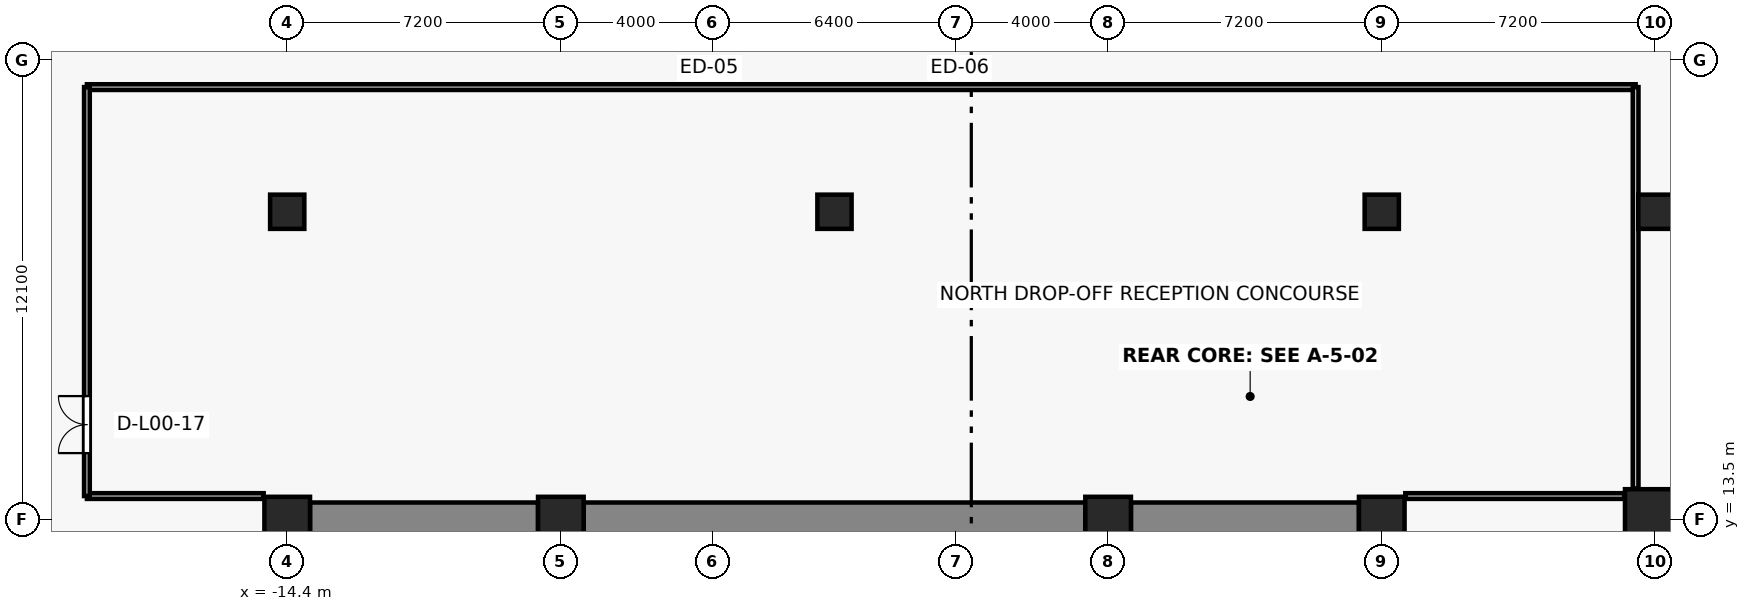
"""IFC4 building model, lengths in metres.
Left out: names, types, materials, properties, quantities, classifications, styles, units other than length and angle.
Written with IfcOpenShell. Run it as: python <this file> out.ifc"""

import sys

from ifc_helpers import new_model, si_unit, direction, frame, frame_2d, origin, origin_2d, place, context, subcontext, project, spatial, rectangle, extrude, source, transform, mapped, element, fill, save


model = new_model("IFC4")
c1 = context("Model", 3, precision=1e-05, world=origin(), true_north=direction((0.0, 1.0)))
c2 = subcontext(c1, "Body", "Model", "MODEL_VIEW")
j1 = project(units=[si_unit("LENGTHUNIT", "METRE"), si_unit("PLANEANGLEUNIT", "RADIAN")], contexts=[c1])
p1 = place(None, origin())
s1 = spatial("IfcSite", under=j1, at=p1, CompositionType="ELEMENT")
p2 = place(p1, origin())
s2 = spatial("IfcBuilding", under=s1, at=p2, CompositionType="ELEMENT")
p3 = place(p2, origin())
s3 = spatial("IfcBuildingStorey", under=s2, at=p3, CompositionType="ELEMENT", Elevation=0.0)
for number, where, z_axis, x_axis in (
    (1, (-14.4, 13.5, 0.0), (0.0, 0.0, 1.0), (1.0, 0.0, 0.0)),
    (2, (-7.2, 13.5, 0.0), (0.0, 0.0, 1.0), (1.0, 0.0, 0.0)),
    (3, (7.2, 13.5, 0.0), (0.0, 0.0, 1.0), (1.0, 0.0, 0.0)),
    (4, (14.4, 13.5, 0.0), (0.0, 0.0, 1.0), (1.0, 0.0, 0.0)),
):
    element("IfcColumn", number, at=place(p3, frame(where, z_axis=z_axis, x_axis=x_axis)), inside=s3, PredefinedType="COLUMN", context=c2, shape_type="SweptSolid", body=[
        extrude(rectangle(XDim=1.2, YDim=1.2, at=origin_2d()), origin(), (0.0, 0.0, 1.0), 5.0),
    ])
p4 = place(p3, frame((21.6, 13.5, 0.0), z_axis=(0.0, 0.0, 1.0), x_axis=(1.0, 0.0, 0.0)))
e5 = element("IfcColumn", 5, at=p4, inside=s3, PredefinedType="COLUMN", context=c2, shape_type="SweptSolid", body=[
    extrude(rectangle(XDim=1.6, YDim=1.6, at=origin_2d()), origin(), (0.0, 0.0, 1.0), 5.0),
])
for number, where, z_axis, x_axis in (
    (6, (21.6, 21.6, 0.0), (0.0, 0.0, 1.0), (1.0, 0.0, 0.0)),
    (7, (-14.4, 21.6, 0.0), (0.0, 0.0, 1.0), (1.0, 0.0, 0.0)),
    (8, (0.0, 21.6, 0.0), (0.0, 0.0, 1.0), (1.0, 0.0, 0.0)),
    (9, (14.4, 21.6, 0.0), (0.0, 0.0, 1.0), (1.0, 0.0, 0.0)),
):
    element("IfcColumn", number, at=place(p3, frame(where, z_axis=z_axis, x_axis=x_axis)), inside=s3, PredefinedType="COLUMN", context=c2, shape_type="SweptSolid", body=[
        extrude(rectangle(XDim=0.9, YDim=0.9, at=origin_2d()), origin(), (0.0, 0.0, 1.0), 5.0),
    ])
p5 = place(p3, frame((-13.8, 13.5, 0.0), z_axis=(0.0, 0.0, 1.0), x_axis=(1.0, 0.0, 0.0)))
e10 = element("IfcWall", 10, at=p5, inside=s3, PredefinedType="SHEAR", context=c2, shape_type="SweptSolid", body=[
    extrude(rectangle(XDim=6.0, YDim=0.9, at=frame_2d((3.0, 0.0))), origin(), (0.0, 0.0, 1.0), 4.7),
])
p6 = place(p3, frame((-6.6, 13.5, 0.0), z_axis=(0.0, 0.0, 1.0), x_axis=(1.0, 0.0, 0.0)))
e11 = element("IfcWall", 11, at=p6, inside=s3, PredefinedType="SHEAR", context=c2, shape_type="SweptSolid", body=[
    extrude(rectangle(XDim=13.2, YDim=0.9, at=frame_2d((6.6, 0.0))), origin(), (0.0, 0.0, 1.0), 4.7),
])
p7 = place(p3, frame((7.8, 13.5, 0.0), z_axis=(0.0, 0.0, 1.0), x_axis=(1.0, 0.0, 0.0)))
e12 = element("IfcWall", 12, at=p7, inside=s3, PredefinedType="SHEAR", context=c2, shape_type="SweptSolid", body=[
    extrude(rectangle(XDim=6.0, YDim=0.9, at=frame_2d((3.0, 0.0))), origin(), (0.0, 0.0, 1.0), 4.7),
])
p8 = place(p3, frame((-15.02, 14.12, 0.0), z_axis=(0.0, 0.0, 1.0), x_axis=(-1.0, 0.0, 0.0)))
e13 = element("IfcWall", 13, at=p8, inside=s3, PredefinedType="PARTITIONING", context=c2, shape_type="SweptSolid", body=[
    extrude(rectangle(XDim=4.65, YDim=0.15, at=frame_2d((2.325, 0.0))), origin(), (0.0, 0.0, 1.0), 4.7),
])
p9 = place(p3, frame((20.78, 14.12, 0.0), z_axis=(0.0, 0.0, 1.0), x_axis=(-1.0, 0.0, 0.0)))
e14 = element("IfcWall", 14, at=p9, inside=s3, PredefinedType="PARTITIONING", context=c2, shape_type="SweptSolid", body=[
    extrude(rectangle(XDim=5.76, YDim=0.15, at=frame_2d((2.88, 0.0))), origin(), (0.0, 0.0, 1.0), 4.7),
])
p10 = place(p3, frame((-19.67, 24.88, 0.0), z_axis=(0.0, 0.0, 1.0), x_axis=(1.0, 0.0, 0.0)))
e15 = element("IfcWall", 15, at=p10, inside=s3, PredefinedType="PARTITIONING", context=c2, shape_type="SweptSolid", body=[
    extrude(rectangle(XDim=40.75, YDim=0.15, at=frame_2d((20.375, 0.0))), origin(), (0.0, 0.0, 1.0), 4.7),
])
p11 = place(p3, frame((-19.67, 14.12, 0.0), z_axis=(0.0, 0.0, 1.0), x_axis=(0.0, 1.0, 0.0)))
e16 = element("IfcWall", 16, at=p11, inside=s3, PredefinedType="PARTITIONING", context=c2, shape_type="SweptSolid", body=[
    extrude(rectangle(XDim=10.76, YDim=0.15, at=frame_2d((5.38, 0.0))), origin(), (0.0, 0.0, 1.0), 3.79),
])
p12 = place(p11, frame((1.13, 0.0, 0.0)))
e17 = element("IfcOpeningElement", 17, at=p12, cuts=e16, PredefinedType="OPENING", context=c2, shape_type="SweptSolid", body=[
    extrude(rectangle(XDim=1.5, YDim=2.2, at=frame_2d((0.75, 1.1))), frame((0.0, 0.085, 0.0), z_axis=(0.0, -1.0, 0.0), x_axis=(1.0, 0.0, 0.0)), (0.0, 0.0, 1.0), 0.17),
])
p13 = place(p3, frame((21.08, 24.88, 0.0), z_axis=(0.0, 0.0, 1.0), x_axis=(0.0, -1.0, 0.0)))
e18 = element("IfcWall", 18, at=p13, inside=s3, PredefinedType="PARTITIONING", context=c2, shape_type="SweptSolid", body=[
    extrude(rectangle(XDim=10.56, YDim=0.15, at=frame_2d((5.28, 0.0))), origin(), (0.0, 0.0, 1.0), 3.79),
])
m1 = source(origin(), c2, "Body", "SweptSolid", [
    extrude(rectangle(XDim=1.5, YDim=2.2, at=frame_2d((0.75, 1.1))), frame((0.0, 0.025, 0.0), z_axis=(0.0, -1.0, 0.0), x_axis=(1.0, 0.0, 0.0)), (0.0, 0.0, 1.0), 0.05),
])
p14 = place(p12, origin())
e19 = element("IfcDoor", 19, at=p14, inside=s3, OperationType="DOUBLE_DOOR_SINGLE_SWING", PredefinedType="DOOR", context=c2, shape_type="MappedRepresentation", body=[
    mapped(m1, transform((0.0, 0.0, 0.0), x_axis=(1.0, 0.0, 0.0), y_axis=(0.0, 1.0, 0.0), z_axis=(0.0, 0.0, 1.0), scale=1.0)),
])
fill(e17, e19)
save(model, sys.argv[1])
